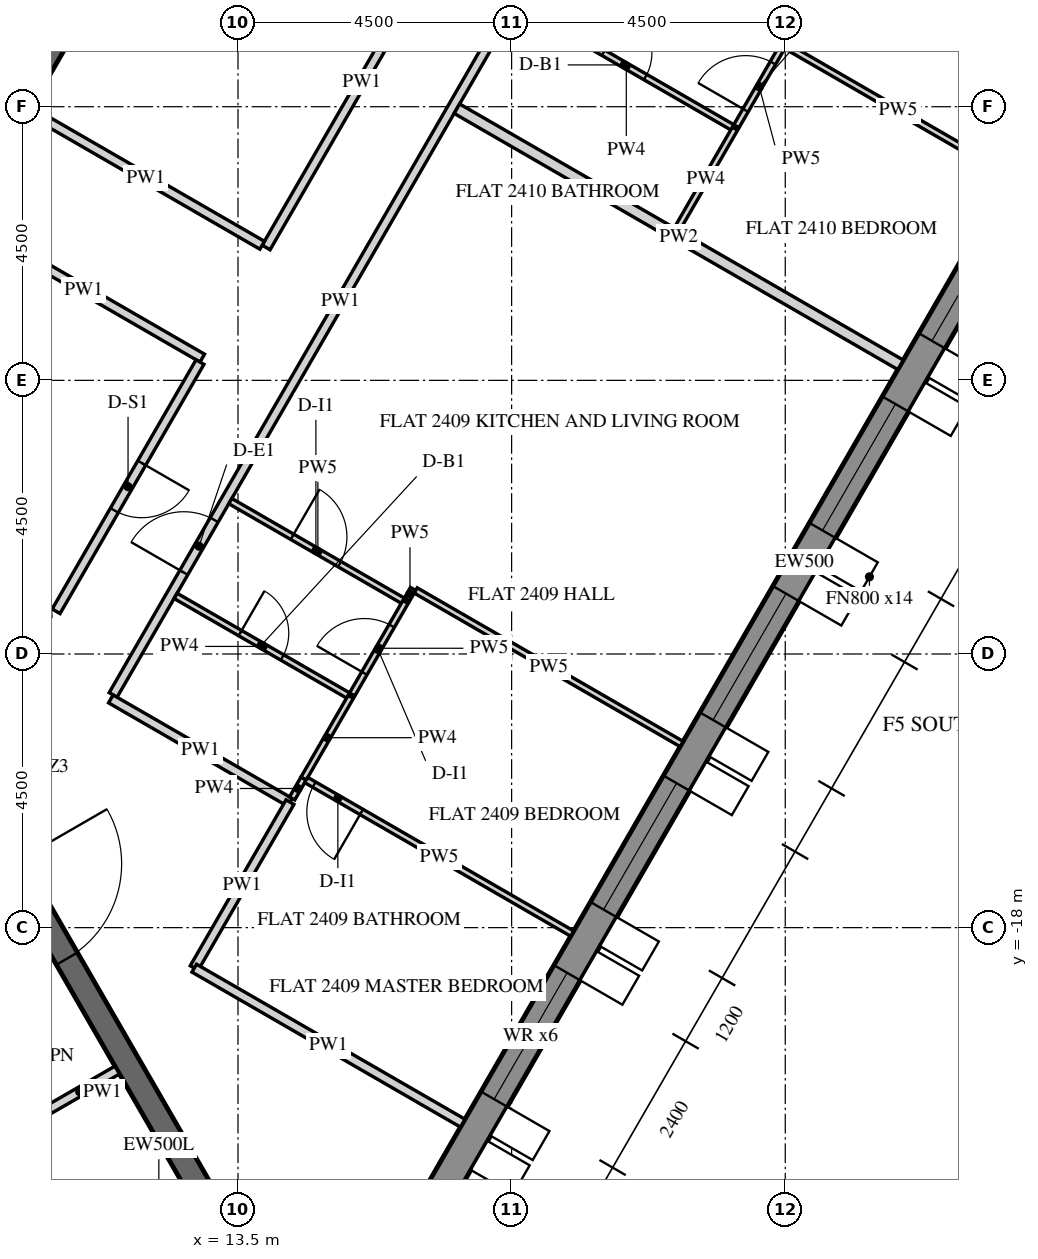
"""IFC4 building model, lengths in metres.
Left out: names, types, materials, properties, quantities, classifications, styles, units other than length and angle.
Written with IfcOpenShell. Run it as: python <this file> out.ifc"""

import sys

from ifc_helpers import new_model, si_unit, direction, frame, frame_2d, origin, place, context, subcontext, project, spatial, polyline, rectangle, outline, extrude, element, fill, save


model = new_model("IFC4")
c1 = context("Model", 3, precision=1e-05, world=origin(), true_north=direction((0.0, 1.0)))
c2 = subcontext(c1, "Body", "Model", "MODEL_VIEW")
j1 = project(units=[si_unit("LENGTHUNIT", "METRE"), si_unit("PLANEANGLEUNIT", "RADIAN")], contexts=[c1])
p1 = place(None, origin())
s1 = spatial("IfcSite", under=j1, at=p1, CompositionType="ELEMENT")
p2 = place(p1, origin())
s2 = spatial("IfcBuilding", under=s1, at=p2, CompositionType="ELEMENT")
p3 = place(p2, frame((0.0, 0.0, 303.0)))
s3 = spatial("IfcBuildingStorey", under=s2, at=p3, CompositionType="ELEMENT", Elevation=303.0)
p4 = place(p3, frame((16.451, -23.005, -0.15), z_axis=(0.0, 0.0, 1.0), x_axis=(0.500003737743, 0.866023245787, 0.0)))
e1 = element("IfcWall", 1, at=p4, inside=s3, PredefinedType="SOLIDWALL", context=c2, shape_type="SweptSolid", body=[
    extrude(outline(polyline([(-0.021, -0.25), (25.468, -0.25), (25.421, 0.25), (0.021, 0.25), (-0.021, -0.25)])), origin(), (0.0, 0.0, 1.0), 3.9),
])
p5 = place(p4, frame((2.522, 0.0, 0.75)))
e2 = element("IfcOpeningElement", 2, at=p5, cuts=e1, PredefinedType="OPENING", context=c2, shape_type="SweptSolid", body=[
    extrude(rectangle(XDim=2.4, YDim=2.7, at=frame_2d((1.2, 1.35))), frame((0.0, 0.26, 0.0), z_axis=(0.0, -1.0, 0.0), x_axis=(1.0, 0.0, 0.0)), (0.0, 0.0, 1.0), 0.52),
])
p6 = place(p4, frame((6.122, 0.0, 0.75)))
e3 = element("IfcOpeningElement", 3, at=p6, cuts=e1, PredefinedType="OPENING", context=c2, shape_type="SweptSolid", body=[
    extrude(rectangle(XDim=2.4, YDim=2.7, at=frame_2d((1.2, 1.35))), frame((0.0, 0.26, 0.0), z_axis=(0.0, -1.0, 0.0), x_axis=(1.0, 0.0, 0.0)), (0.0, 0.0, 1.0), 0.52),
])
p7 = place(p4, frame((9.722, 0.0, 0.75)))
e4 = element("IfcOpeningElement", 4, at=p7, cuts=e1, PredefinedType="OPENING", context=c2, shape_type="SweptSolid", body=[
    extrude(rectangle(XDim=2.4, YDim=2.7, at=frame_2d((1.2, 1.35))), frame((0.0, 0.26, 0.0), z_axis=(0.0, -1.0, 0.0), x_axis=(1.0, 0.0, 0.0)), (0.0, 0.0, 1.0), 0.52),
])
p8 = place(p4, frame((13.323, 0.0, 0.75)))
e5 = element("IfcOpeningElement", 5, at=p8, cuts=e1, PredefinedType="OPENING", context=c2, shape_type="SweptSolid", body=[
    extrude(rectangle(XDim=2.4, YDim=2.7, at=frame_2d((1.2, 1.35))), frame((0.0, 0.26, 0.0), z_axis=(0.0, -1.0, 0.0), x_axis=(1.0, 0.0, 0.0)), (0.0, 0.0, 1.0), 0.52),
])
p9 = place(p4, frame((16.922, 0.0, 0.75)))
e6 = element("IfcOpeningElement", 6, at=p9, cuts=e1, PredefinedType="OPENING", context=c2, shape_type="SweptSolid", body=[
    extrude(rectangle(XDim=2.4, YDim=2.7, at=frame_2d((1.2, 1.35))), frame((0.0, 0.26, 0.0), z_axis=(0.0, -1.0, 0.0), x_axis=(1.0, 0.0, 0.0)), (0.0, 0.0, 1.0), 0.52),
])
p10 = place(p4, frame((20.522, 0.0, 0.75)))
e7 = element("IfcOpeningElement", 7, at=p10, cuts=e1, PredefinedType="OPENING", context=c2, shape_type="SweptSolid", body=[
    extrude(rectangle(XDim=2.4, YDim=2.7, at=frame_2d((1.2, 1.35))), frame((0.0, 0.26, 0.0), z_axis=(0.0, -1.0, 0.0), x_axis=(1.0, 0.0, 0.0)), (0.0, 0.0, 1.0), 0.52),
])
p11 = place(p3, frame((6.235, -10.8, -0.15), z_axis=(0.0, 0.0, 1.0), x_axis=(0.499996419489, 0.866027470984, 0.0)))
e8 = element("IfcWall", 8, at=p11, inside=s3, PredefinedType="SHEAR", context=c2, shape_type="SweptSolid", body=[
    extrude(outline(polyline([(-0.115, -0.2), (12.586, -0.2), (12.355, 0.2), (0.115, 0.2), (-0.115, -0.2)])), origin(), (0.0, 0.0, 1.0), 3.9),
])
p12 = place(p11, frame((5.364, 0.0, 0.15)))
e9 = element("IfcOpeningElement", 9, at=p12, cuts=e8, PredefinedType="OPENING", context=c2, shape_type="SweptSolid", body=[
    extrude(rectangle(XDim=1.8, YDim=2.4, at=frame_2d((0.9, 1.2))), frame((0.0, 0.21, 0.0), z_axis=(0.0, -1.0, 0.0), x_axis=(1.0, 0.0, 0.0)), (0.0, 0.0, 1.0), 0.42),
])
p13 = place(p3, frame((6.351, -11.0, -0.15), z_axis=(0.0, 0.0, 1.0), x_axis=(0.499998894578, -0.866026041999, 0.0)))
e10 = element("IfcWall", 10, at=p13, inside=s3, PredefinedType="SHEAR", context=c2, shape_type="SweptSolid", body=[
    extrude(rectangle(XDim=15.544, YDim=0.4, at=frame_2d((7.772, 0.0))), origin(), (0.0, 0.0, 1.0), 3.9),
])
p14 = place(p13, frame((6.872, 0.0, 0.15)))
e11 = element("IfcOpeningElement", 11, at=p14, cuts=e10, PredefinedType="OPENING", context=c2, shape_type="SweptSolid", body=[
    extrude(rectangle(XDim=1.8, YDim=2.4, at=frame_2d((0.9, 1.2))), frame((0.0, 0.21, 0.0), z_axis=(0.0, -1.0, 0.0), x_axis=(1.0, 0.0, 0.0)), (0.0, 0.0, 1.0), 0.42),
])
p15 = place(p3, frame((10.28, -21.055, 0.0), z_axis=(0.0, 0.0, 1.0), x_axis=(0.866020080793, 0.500009219579, 0.0)))
e12 = element("IfcWall", 12, at=p15, inside=s3, PredefinedType="PARTITIONING", context=c2, shape_type="SweptSolid", body=[
    extrude(rectangle(XDim=1.425, YDim=0.15, at=frame_2d((0.712, 0.0))), origin(), (0.0, 0.0, 1.0), 2.988),
])
p16 = place(p3, frame((11.447, -14.174, 0.0), z_axis=(0.0, 0.0, 1.0), x_axis=(0.500003306199, 0.866023494941, 0.0)))
e13 = element("IfcWall", 13, at=p16, inside=s3, PredefinedType="PARTITIONING", context=c2, shape_type="SweptSolid", body=[
    extrude(rectangle(XDim=14.949, YDim=0.15, at=frame_2d((7.475, 0.0))), origin(), (0.0, 0.0, 1.0), 2.988),
])
p17 = place(p16, frame((2.325, 0.0, 0.0)))
e14 = element("IfcOpeningElement", 14, at=p17, cuts=e13, PredefinedType="OPENING", context=c2, shape_type="SweptSolid", body=[
    extrude(rectangle(XDim=1.0, YDim=2.1, at=frame_2d((0.5, 1.05))), frame((0.0, 0.085, 0.0), z_axis=(0.0, -1.0, 0.0), x_axis=(1.0, 0.0, 0.0)), (0.0, 0.0, 1.0), 0.17),
])
p18 = place(p16, frame((13.776, 0.0, 0.0)))
e15 = element("IfcOpeningElement", 15, at=p18, cuts=e13, PredefinedType="OPENING", context=c2, shape_type="SweptSolid", body=[
    extrude(rectangle(XDim=1.0, YDim=2.1, at=frame_2d((0.5, 1.05))), frame((0.0, 0.085, 0.0), z_axis=(0.0, -1.0, 0.0), x_axis=(1.0, 0.0, 0.0)), (0.0, 0.0, 1.0), 0.17),
])
p19 = place(p3, frame((14.354, -15.939, 0.0), z_axis=(0.0, 0.0, 1.0), x_axis=(-0.866020560687, 0.500008388397, 0.0)))
e16 = element("IfcWall", 16, at=p19, inside=s3, PredefinedType="PARTITIONING", context=c2, shape_type="SweptSolid", body=[
    extrude(rectangle(XDim=3.4, YDim=0.15, at=frame_2d((1.7, 0.0))), origin(), (0.0, 0.0, 1.0), 2.988),
])
p20 = place(p3, frame((12.78, -18.665, 0.0), z_axis=(0.0, 0.0, 1.0), x_axis=(0.499972881236, 0.866041060244, 0.0)))
e17 = element("IfcWall", 17, at=p20, inside=s3, PredefinedType="PARTITIONING", context=c2, shape_type="SweptSolid", body=[
    extrude(rectangle(XDim=3.151, YDim=0.15, at=frame_2d((1.575, 0.0))), origin(), (0.0, 0.0, 1.0), 2.988),
])
p21 = place(p3, frame((17.196, -21.216, 0.0), z_axis=(0.0, 0.0, 1.0), x_axis=(-0.866024511559, 0.500001545377, 0.0)))
e18 = element("IfcWall", 18, at=p21, inside=s3, PredefinedType="PARTITIONING", context=c2, shape_type="SweptSolid", body=[
    extrude(rectangle(XDim=5.099, YDim=0.15, at=frame_2d((2.549, 0.0))), origin(), (0.0, 0.0, 1.0), 2.988),
])
p22 = place(p3, frame((17.112, -1.362, 0.0), z_axis=(0.0, 0.0, 1.0), x_axis=(-0.49999985423, -0.866025487945, 0.0)))
e19 = element("IfcWall", 19, at=p22, inside=s3, PredefinedType="PARTITIONING", context=c2, shape_type="SweptSolid", body=[
    extrude(rectangle(XDim=6.298, YDim=0.15, at=frame_2d((3.149, 0.0))), origin(), (0.0, 0.0, 1.0), 2.988),
])
p23 = place(p3, frame((13.898, -6.778, 0.0), z_axis=(0.0, 0.0, 1.0), x_axis=(-0.866041342403, 0.499972392486, 0.0)))
e20 = element("IfcWall", 20, at=p23, inside=s3, PredefinedType="PARTITIONING", context=c2, shape_type="SweptSolid", body=[
    extrude(rectangle(XDim=4.425, YDim=0.15, at=frame_2d((2.212, 0.0))), origin(), (0.0, 0.0, 1.0), 2.988),
])
p24 = place(p3, frame((9.016, -6.384, 0.0), z_axis=(0.0, 0.0, 1.0), x_axis=(0.866031096941, -0.499990139034, 0.0)))
e21 = element("IfcWall", 21, at=p24, inside=s3, PredefinedType="PARTITIONING", context=c2, shape_type="SweptSolid", body=[
    extrude(rectangle(XDim=4.5, YDim=0.15, at=frame_2d((2.25, 0.0))), origin(), (0.0, 0.0, 1.0), 2.988),
])
p25 = place(p3, frame((12.875, -8.699, 0.0), z_axis=(0.0, 0.0, 1.0), x_axis=(-0.49999482868, -0.866028389427, 0.0)))
e22 = element("IfcWall", 22, at=p25, inside=s3, PredefinedType="PARTITIONING", context=c2, shape_type="SweptSolid", body=[
    extrude(rectangle(XDim=4.733, YDim=0.15, at=frame_2d((2.366, 0.0))), origin(), (0.0, 0.0, 1.0), 2.988),
])
p26 = place(p25, frame((1.917, 0.0, 0.0)))
e23 = element("IfcOpeningElement", 23, at=p26, cuts=e22, PredefinedType="OPENING", context=c2, shape_type="SweptSolid", body=[
    extrude(rectangle(XDim=0.9, YDim=2.1, at=frame_2d((0.45, 1.05))), frame((0.0, 0.085, 0.0), z_axis=(0.0, -1.0, 0.0), x_axis=(1.0, 0.0, 0.0)), (0.0, 0.0, 1.0), 0.17),
])
p27 = place(p3, frame((13.374, -10.985, 0.0), z_axis=(0.0, 0.0, 1.0), x_axis=(0.866020521143, -0.500008456887, 0.0)))
e24 = element("IfcWall", 24, at=p27, inside=s3, PredefinedType="PARTITIONING", context=c2, shape_type="SweptSolid", body=[
    extrude(rectangle(XDim=3.325, YDim=0.1, at=frame_2d((1.663, 0.0))), origin(), (0.0, 0.0, 1.0), 2.988),
])
p28 = place(p27, frame((1.175, 0.0, 0.0)))
e25 = element("IfcOpeningElement", 25, at=p28, cuts=e24, PredefinedType="OPENING", context=c2, shape_type="SweptSolid", body=[
    extrude(rectangle(XDim=0.9, YDim=2.1, at=frame_2d((0.45, 1.05))), frame((0.0, 0.06, 0.0), z_axis=(0.0, -1.0, 0.0), x_axis=(1.0, 0.0, 0.0)), (0.0, 0.0, 1.0), 0.12),
])
p29 = place(p3, frame((16.278, -12.606, 0.0), z_axis=(0.0, 0.0, 1.0), x_axis=(0.500137716533, 0.865945878506, 0.0)))
e26 = element("IfcWall", 26, at=p29, inside=s3, PredefinedType="PARTITIONING", context=c2, shape_type="SweptSolid", body=[
    extrude(rectangle(XDim=0.204, YDim=0.1, at=frame_2d((0.102, 0.0))), origin(), (0.0, 0.0, 1.0), 2.988),
])
p30 = place(p3, frame((16.423, -12.455, 0.0), z_axis=(0.0, 0.0, 1.0), x_axis=(0.866018134068, -0.500012591307, 0.0)))
e27 = element("IfcWall", 27, at=p30, inside=s3, PredefinedType="PARTITIONING", context=c2, shape_type="SweptSolid", body=[
    extrude(rectangle(XDim=5.05, YDim=0.1, at=frame_2d((2.525, 0.0))), origin(), (0.0, 0.0, 1.0), 2.988),
])
p31 = place(p3, frame((24.396, -8.745, 0.0), z_axis=(0.0, 0.0, 1.0), x_axis=(-0.866014270972, 0.500019282102, 0.0)))
e28 = element("IfcWall", 28, at=p31, inside=s3, PredefinedType="PARTITIONING", context=c2, shape_type="SweptSolid", body=[
    extrude(rectangle(XDim=8.425, YDim=0.18, at=frame_2d((4.212, 0.0))), origin(), (0.0, 0.0, 1.0), 2.988),
])
p32 = place(p3, frame((12.474, -12.544, 0.0), z_axis=(0.0, 0.0, 1.0), x_axis=(0.866002163101, -0.500040251884, 0.0)))
e29 = element("IfcWall", 29, at=p32, inside=s3, PredefinedType="PARTITIONING", context=c2, shape_type="SweptSolid", body=[
    extrude(rectangle(XDim=3.325, YDim=0.1, at=frame_2d((1.663, 0.0))), origin(), (0.0, 0.0, 1.0), 2.988),
])
p33 = place(p32, frame((1.225, 0.0, 0.0)))
e30 = element("IfcOpeningElement", 30, at=p33, cuts=e29, PredefinedType="OPENING", context=c2, shape_type="SweptSolid", body=[
    extrude(rectangle(XDim=0.8, YDim=2.1, at=frame_2d((0.4, 1.05))), frame((0.0, 0.06, 0.0), z_axis=(0.0, -1.0, 0.0), x_axis=(1.0, 0.0, 0.0)), (0.0, 0.0, 1.0), 0.12),
])
p34 = place(p3, frame((15.378, -14.165, 0.0), z_axis=(0.0, 0.0, 1.0), x_axis=(0.499971461383, 0.866041879935, 0.0)))
e31 = element("IfcWall", 31, at=p34, inside=s3, PredefinedType="PARTITIONING", context=c2, shape_type="SweptSolid", body=[
    extrude(rectangle(XDim=1.754, YDim=0.1, at=frame_2d((0.877, 0.0))), origin(), (0.0, 0.0, 1.0), 2.988),
])
p35 = place(p34, frame((0.402, 0.0, 0.0)))
e32 = element("IfcOpeningElement", 32, at=p35, cuts=e31, PredefinedType="OPENING", context=c2, shape_type="SweptSolid", body=[
    extrude(rectangle(XDim=0.9, YDim=2.1, at=frame_2d((0.45, 1.05))), frame((0.0, 0.06, 0.0), z_axis=(0.0, -1.0, 0.0), x_axis=(1.0, 0.0, 0.0)), (0.0, 0.0, 1.0), 0.12),
])
p36 = place(p3, frame((14.39, -15.875, 0.0), z_axis=(0.0, 0.0, 1.0), x_axis=(0.500094824054, 0.865970650169, 0.0)))
e33 = element("IfcWall", 33, at=p36, inside=s3, PredefinedType="PARTITIONING", context=c2, shape_type="SweptSolid", body=[
    extrude(rectangle(XDim=0.378, YDim=0.1, at=frame_2d((0.189, 0.0))), origin(), (0.0, 0.0, 1.0), 2.988),
])
p37 = place(p3, frame((14.579, -15.548, 0.0), z_axis=(0.0, 0.0, 1.0), x_axis=(0.499949632511, 0.866054481515, 0.0)))
e34 = element("IfcWall", 34, at=p37, inside=s3, PredefinedType="PARTITIONING", context=c2, shape_type="SweptSolid", body=[
    extrude(rectangle(XDim=1.551, YDim=0.1, at=frame_2d((0.775, 0.0))), origin(), (0.0, 0.0, 1.0), 2.988),
])
p38 = place(p3, frame((18.996, -18.098, 0.0), z_axis=(0.0, 0.0, 1.0), x_axis=(-0.866039067339, 0.499976333282, 0.0)))
e35 = element("IfcWall", 35, at=p38, inside=s3, PredefinedType="PARTITIONING", context=c2, shape_type="SweptSolid", body=[
    extrude(rectangle(XDim=5.05, YDim=0.1, at=frame_2d((2.525, 0.0))), origin(), (0.0, 0.0, 1.0), 2.988),
])
p39 = place(p38, frame((4.0, 0.0, 0.0)))
e36 = element("IfcOpeningElement", 36, at=p39, cuts=e35, PredefinedType="OPENING", context=c2, shape_type="SweptSolid", body=[
    extrude(rectangle(XDim=0.9, YDim=2.1, at=frame_2d((0.45, 1.05))), frame((0.0, 0.06, 0.0), z_axis=(0.0, -1.0, 0.0), x_axis=(1.0, 0.0, 0.0)), (0.0, 0.0, 1.0), 0.12),
])
p40 = place(p3, frame((22.515, -3.502, 0.0), z_axis=(0.0, 0.0, 1.0), x_axis=(0.866028703517, -0.499994284652, 0.0)))
e37 = element("IfcWall", 37, at=p40, inside=s3, PredefinedType="PARTITIONING", context=c2, shape_type="SweptSolid", body=[
    extrude(rectangle(XDim=4.25, YDim=0.1, at=frame_2d((2.125, 0.0))), origin(), (0.0, 0.0, 1.0), 2.988),
])
p41 = place(p3, frame((18.1, -2.8, 0.0), z_axis=(0.0, 0.0, 1.0), x_axis=(0.866019999656, -0.500009360108, 0.0)))
e38 = element("IfcWall", 38, at=p41, inside=s3, PredefinedType="PARTITIONING", context=c2, shape_type="SweptSolid", body=[
    extrude(rectangle(XDim=4.125, YDim=0.1, at=frame_2d((2.062, 0.0))), origin(), (0.0, 0.0, 1.0), 2.988),
])
p42 = place(p41, frame((1.625, 0.0, 0.0)))
e39 = element("IfcOpeningElement", 39, at=p42, cuts=e38, PredefinedType="OPENING", context=c2, shape_type="SweptSolid", body=[
    extrude(rectangle(XDim=0.8, YDim=2.1, at=frame_2d((0.4, 1.05))), frame((0.0, 0.06, 0.0), z_axis=(0.0, -1.0, 0.0), x_axis=(1.0, 0.0, 0.0)), (0.0, 0.0, 1.0), 0.12),
])
p43 = place(p3, frame((21.696, -4.821, 0.0), z_axis=(0.0, 0.0, 1.0), x_axis=(0.499985098601, 0.86603400694, 0.0)))
e40 = element("IfcWall", 40, at=p43, inside=s3, PredefinedType="PARTITIONING", context=c2, shape_type="SweptSolid", body=[
    extrude(rectangle(XDim=1.502, YDim=0.1, at=frame_2d((0.751, 0.0))), origin(), (0.0, 0.0, 1.0), 2.988),
])
p44 = place(p43, frame((0.302, 0.0, 0.0)))
e41 = element("IfcOpeningElement", 41, at=p44, cuts=e40, PredefinedType="OPENING", context=c2, shape_type="SweptSolid", body=[
    extrude(rectangle(XDim=0.9, YDim=2.1, at=frame_2d((0.45, 1.05))), frame((0.0, 0.06, 0.0), z_axis=(0.0, -1.0, 0.0), x_axis=(1.0, 0.0, 0.0)), (0.0, 0.0, 1.0), 0.12),
])
p45 = place(p3, frame((20.717, -6.517, 0.0), z_axis=(0.0, 0.0, 1.0), x_axis=(0.500039310002, 0.866002706955, 0.0)))
e42 = element("IfcWall", 42, at=p45, inside=s3, PredefinedType="PARTITIONING", context=c2, shape_type="SweptSolid", body=[
    extrude(rectangle(XDim=1.912, YDim=0.1, at=frame_2d((0.956, 0.0))), origin(), (0.0, 0.0, 1.0), 2.988),
])
p46 = place(p5, frame((0.0, 0.18, 0.0)))
e43 = element("IfcWindow", 43, at=p46, inside=s3, PartitioningType="DOUBLE_PANEL_VERTICAL", PredefinedType="WINDOW", context=c2, shape_type="SweptSolid", body=[
    extrude(rectangle(XDim=2.4, YDim=2.7, at=frame_2d((1.2, 1.35))), frame((0.0, 0.03, 0.0), z_axis=(0.0, -1.0, 0.0), x_axis=(1.0, 0.0, 0.0)), (0.0, 0.0, 1.0), 0.06),
])
fill(e2, e43)
p47 = place(p6, frame((0.0, 0.18, 0.0)))
e44 = element("IfcWindow", 44, at=p47, inside=s3, PartitioningType="DOUBLE_PANEL_VERTICAL", PredefinedType="WINDOW", context=c2, shape_type="SweptSolid", body=[
    extrude(rectangle(XDim=2.4, YDim=2.7, at=frame_2d((1.2, 1.35))), frame((0.0, 0.03, 0.0), z_axis=(0.0, -1.0, 0.0), x_axis=(1.0, 0.0, 0.0)), (0.0, 0.0, 1.0), 0.06),
])
fill(e3, e44)
p48 = place(p7, frame((0.0, 0.18, 0.0)))
e45 = element("IfcWindow", 45, at=p48, inside=s3, PartitioningType="DOUBLE_PANEL_VERTICAL", PredefinedType="WINDOW", context=c2, shape_type="SweptSolid", body=[
    extrude(rectangle(XDim=2.4, YDim=2.7, at=frame_2d((1.2, 1.35))), frame((0.0, 0.03, 0.0), z_axis=(0.0, -1.0, 0.0), x_axis=(1.0, 0.0, 0.0)), (0.0, 0.0, 1.0), 0.06),
])
fill(e4, e45)
p49 = place(p8, frame((0.0, 0.18, 0.0)))
e46 = element("IfcWindow", 46, at=p49, inside=s3, PartitioningType="DOUBLE_PANEL_VERTICAL", PredefinedType="WINDOW", context=c2, shape_type="SweptSolid", body=[
    extrude(rectangle(XDim=2.4, YDim=2.7, at=frame_2d((1.2, 1.35))), frame((0.0, 0.03, 0.0), z_axis=(0.0, -1.0, 0.0), x_axis=(1.0, 0.0, 0.0)), (0.0, 0.0, 1.0), 0.06),
])
fill(e5, e46)
p50 = place(p9, frame((0.0, 0.18, 0.0)))
e47 = element("IfcWindow", 47, at=p50, inside=s3, PartitioningType="DOUBLE_PANEL_VERTICAL", PredefinedType="WINDOW", context=c2, shape_type="SweptSolid", body=[
    extrude(rectangle(XDim=2.4, YDim=2.7, at=frame_2d((1.2, 1.35))), frame((0.0, 0.03, 0.0), z_axis=(0.0, -1.0, 0.0), x_axis=(1.0, 0.0, 0.0)), (0.0, 0.0, 1.0), 0.06),
])
fill(e6, e47)
p51 = place(p14, origin())
e48 = element("IfcDoor", 48, at=p51, inside=s3, OperationType="DOUBLE_DOOR_SINGLE_SWING", PredefinedType="DOOR", context=c2, shape_type="SweptSolid", body=[
    extrude(rectangle(XDim=1.8, YDim=2.4, at=frame_2d((0.9, 1.2))), frame((0.0, 0.025, 0.0), z_axis=(0.0, -1.0, 0.0), x_axis=(1.0, 0.0, 0.0)), (0.0, 0.0, 1.0), 0.05),
])
fill(e11, e48)
p52 = place(p17, origin())
e49 = element("IfcDoor", 49, at=p52, inside=s3, OperationType="SINGLE_SWING_LEFT", PredefinedType="DOOR", context=c2, shape_type="SweptSolid", body=[
    extrude(rectangle(XDim=1.0, YDim=2.1, at=frame_2d((0.5, 1.05))), frame((0.0, 0.025, 0.0), z_axis=(0.0, -1.0, 0.0), x_axis=(1.0, 0.0, 0.0)), (0.0, 0.0, 1.0), 0.05),
])
fill(e14, e49)
p53 = place(p33, origin())
e50 = element("IfcDoor", 50, at=p53, inside=s3, OperationType="SINGLE_SWING_RIGHT", PredefinedType="DOOR", context=c2, shape_type="SweptSolid", body=[
    extrude(rectangle(XDim=0.8, YDim=2.1, at=frame_2d((0.4, 1.05))), frame((0.0, 0.025, 0.0), z_axis=(0.0, -1.0, 0.0), x_axis=(1.0, 0.0, 0.0)), (0.0, 0.0, 1.0), 0.05),
])
fill(e30, e50)
p54 = place(p28, origin())
e51 = element("IfcDoor", 51, at=p54, inside=s3, OperationType="SINGLE_SWING_RIGHT", PredefinedType="DOOR", context=c2, shape_type="SweptSolid", body=[
    extrude(rectangle(XDim=0.9, YDim=2.1, at=frame_2d((0.45, 1.05))), frame((0.0, 0.025, 0.0), z_axis=(0.0, -1.0, 0.0), x_axis=(1.0, 0.0, 0.0)), (0.0, 0.0, 1.0), 0.05),
])
fill(e25, e51)
p55 = place(p39, origin())
e52 = element("IfcDoor", 52, at=p55, inside=s3, OperationType="SINGLE_SWING_RIGHT", PredefinedType="DOOR", context=c2, shape_type="SweptSolid", body=[
    extrude(rectangle(XDim=0.9, YDim=2.1, at=frame_2d((0.45, 1.05))), frame((0.0, 0.025, 0.0), z_axis=(0.0, -1.0, 0.0), x_axis=(1.0, 0.0, 0.0)), (0.0, 0.0, 1.0), 0.05),
])
fill(e36, e52)
p56 = place(p35, origin())
e53 = element("IfcDoor", 53, at=p56, inside=s3, OperationType="SINGLE_SWING_RIGHT", PredefinedType="DOOR", context=c2, shape_type="SweptSolid", body=[
    extrude(rectangle(XDim=0.9, YDim=2.1, at=frame_2d((0.45, 1.05))), frame((0.0, 0.025, 0.0), z_axis=(0.0, -1.0, 0.0), x_axis=(1.0, 0.0, 0.0)), (0.0, 0.0, 1.0), 0.05),
])
fill(e32, e53)
p57 = place(p42, origin())
e54 = element("IfcDoor", 54, at=p57, inside=s3, OperationType="SINGLE_SWING_RIGHT", PredefinedType="DOOR", context=c2, shape_type="SweptSolid", body=[
    extrude(rectangle(XDim=0.8, YDim=2.1, at=frame_2d((0.4, 1.05))), frame((0.0, 0.025, 0.0), z_axis=(0.0, -1.0, 0.0), x_axis=(1.0, 0.0, 0.0)), (0.0, 0.0, 1.0), 0.05),
])
fill(e39, e54)
p58 = place(p44, origin())
e55 = element("IfcDoor", 55, at=p58, inside=s3, OperationType="SINGLE_SWING_LEFT", PredefinedType="DOOR", context=c2, shape_type="SweptSolid", body=[
    extrude(rectangle(XDim=0.9, YDim=2.1, at=frame_2d((0.45, 1.05))), frame((0.0, 0.025, 0.0), z_axis=(0.0, -1.0, 0.0), x_axis=(1.0, 0.0, 0.0)), (0.0, 0.0, 1.0), 0.05),
])
fill(e41, e55)
p59 = place(p26, origin())
e56 = element("IfcDoor", 56, at=p59, inside=s3, OperationType="SINGLE_SWING_LEFT", PredefinedType="DOOR", context=c2, shape_type="SweptSolid", body=[
    extrude(rectangle(XDim=0.9, YDim=2.1, at=frame_2d((0.45, 1.05))), frame((0.0, 0.025, 0.0), z_axis=(0.0, -1.0, 0.0), x_axis=(1.0, 0.0, 0.0)), (0.0, 0.0, 1.0), 0.05),
])
fill(e23, e56)
save(model, sys.argv[1])
